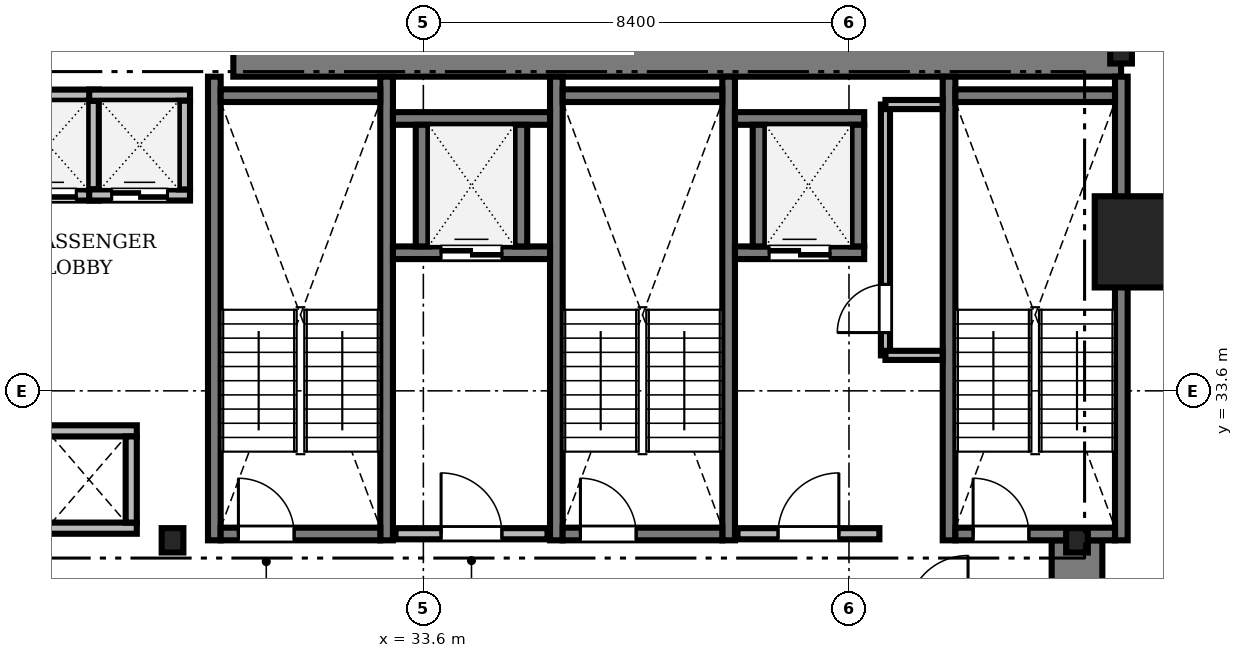
"""IFC4 building model, lengths in metres.
Left out: names, types, materials, properties, quantities, classifications, styles, units other than length and angle.
Written with IfcOpenShell. Run it as: python <this file> out.ifc"""

import sys

from ifc_helpers import new_model, si_unit, direction, frame, frame_2d, origin, origin_2d, place, context, subcontext, project, spatial, rectangle, i_section, extrude, source, transform, mapped, element, fill, save


model = new_model("IFC4")
c1 = context("Model", 3, precision=1e-05, world=origin(), true_north=direction((0.0, 1.0)))
c2 = subcontext(c1, "Body", "Model", "MODEL_VIEW")
j1 = project(units=[si_unit("LENGTHUNIT", "METRE"), si_unit("PLANEANGLEUNIT", "RADIAN")], contexts=[c1])
p1 = place(None, origin())
s1 = spatial("IfcSite", under=j1, at=p1, CompositionType="ELEMENT")
p2 = place(p1, origin())
s2 = spatial("IfcBuilding", under=s1, at=p2, CompositionType="ELEMENT")
p3 = place(p2, frame((0.0, 0.0, 64.1)))
s3 = spatial("IfcBuildingStorey", under=s2, at=p3, CompositionType="ELEMENT", Elevation=64.1)
m1 = source(origin(), c2, "Body", "SweptSolid", [
    extrude(rectangle(XDim=17.52, YDim=1.0, at=frame_2d((8.76, 0.0))), origin(), (0.0, 0.0, 1.0), 3.41),
])
p4 = place(p3, frame((29.85, 40.3, 0.0), z_axis=(0.0, 0.0, 1.0), x_axis=(1.0, 0.0, 0.0)))
e1 = element("IfcWall", 1, at=p4, inside=s3, PredefinedType="SHEAR", context=c2, shape_type="MappedRepresentation", body=[
    mapped(m1, transform((0.0, 0.0, 0.0), scale=1.0)),
])
m2 = source(origin(), c2, "Body", "SweptSolid", [
    extrude(rectangle(XDim=13.15, YDim=1.0, at=frame_2d((6.575, 0.0))), origin(), (0.0, 0.0, 1.0), 3.41),
])
p5 = place(p3, frame((46.5, 17.5, 0.0), z_axis=(0.0, 0.0, 1.0), x_axis=(0.0, 1.0, 0.0)))
e2 = element("IfcWall", 2, at=p5, inside=s3, PredefinedType="SHEAR", context=c2, shape_type="MappedRepresentation", body=[
    mapped(m2, transform((0.0, 0.0, 0.0), scale=1.0)),
])
m3 = source(origin(), c2, "Body", "SweptSolid", [
    extrude(i_section(OverallWidth=0.428, OverallDepth=0.481, WebThickness=0.04, FlangeThickness=0.063, FilletRadius=0.015, at=origin_2d()), origin(), (0.0, 0.0, 1.0), 3.41),
])
for number, where, z_axis, x_axis in (
    (3, (28.65, 30.65, 0.0), (0.0, 0.0, 1.0), (1.0, 0.0, 0.0)),
    (4, (46.5, 30.65, 0.0), (0.0, 0.0, 1.0), (1.0, 0.0, 0.0)),
    (5, (47.37, 40.3, 0.0), (0.0, 0.0, 1.0), (1.0, 0.0, 0.0)),
):
    element("IfcColumn", number, at=place(p3, frame(where, z_axis=z_axis, x_axis=x_axis)), inside=s3, PredefinedType="COLUMN", context=c2, shape_type="MappedRepresentation", body=[
        mapped(m3, transform((0.0, 0.0, 0.0), scale=1.0)),
    ])
m4 = source(origin(), c2, "Body", "SweptSolid", [
    extrude(rectangle(XDim=1.8, YDim=1.8, at=origin_2d()), origin(), (0.0, 0.0, 1.0), 3.41),
])
p6 = place(p3, frame((47.75, 36.54, 0.0), z_axis=(0.0, 0.0, 1.0), x_axis=(1.0, 0.0, 0.0)))
e6 = element("IfcColumn", 6, at=p6, inside=s3, PredefinedType="COLUMN", context=c2, shape_type="MappedRepresentation", body=[
    mapped(m4, transform((0.0, 0.0, 0.0), scale=1.0)),
])
m5 = source(origin(), c2, "Body", "SweptSolid", [
    extrude(rectangle(XDim=9.15, YDim=0.25, at=frame_2d((4.575, 0.0))), origin(), (0.0, 0.0, 1.0), 3.45),
])
for number, where, z_axis, x_axis in (
    (7, (29.475, 30.65, 0.0), (0.0, 0.0, 1.0), (0.0, 1.0, 0.0)),
    (8, (32.875, 30.65, 0.0), (0.0, 0.0, 1.0), (0.0, 1.0, 0.0)),
):
    element("IfcWall", number, at=place(p3, frame(where, z_axis=z_axis, x_axis=x_axis)), inside=s3, PredefinedType="SOLIDWALL", context=c2, shape_type="MappedRepresentation", body=[
        mapped(m5, transform((0.0, 0.0, 0.0), scale=1.0)),
    ])
m6 = source(origin(), c2, "Body", "SweptSolid", [
    extrude(rectangle(XDim=3.15, YDim=0.25, at=frame_2d((1.575, 0.0))), origin(), (0.0, 0.0, 1.0), 3.45),
])
p7 = place(p3, frame((29.6, 39.425, 0.0), z_axis=(0.0, 0.0, 1.0), x_axis=(1.0, 0.0, 0.0)))
e9 = element("IfcWall", 9, at=p7, inside=s3, PredefinedType="SOLIDWALL", context=c2, shape_type="MappedRepresentation", body=[
    mapped(m6, transform((0.0, 0.0, 0.0), scale=1.0)),
])
p8 = place(p3, frame((29.6, 30.775, 0.0), z_axis=(0.0, 0.0, 1.0), x_axis=(1.0, 0.0, 0.0)))
e10 = element("IfcWall", 10, at=p8, inside=s3, PredefinedType="SOLIDWALL", context=c2, shape_type="MappedRepresentation", body=[
    mapped(m6, transform((0.0, 0.0, 0.0), scale=1.0)),
])
m7 = source(origin(), c2, "Body", "SweptSolid", [
    extrude(rectangle(XDim=1.1, YDim=2.2, at=frame_2d((0.55, 1.1))), frame((0.0, 0.135, 0.0), z_axis=(0.0, -1.0, 0.0), x_axis=(1.0, 0.0, 0.0)), (0.0, 0.0, 1.0), 0.27),
])
p9 = place(p8, frame((0.35, 0.0, 0.0)))
e11 = element("IfcOpeningElement", 11, at=p9, cuts=e10, PredefinedType="OPENING", context=c2, shape_type="MappedRepresentation", body=[
    mapped(m7, transform((0.0, 0.0, 0.0), scale=1.0)),
])
for number, where, z_axis, x_axis in (
    (12, (36.225, 30.65, 0.0), (0.0, 0.0, 1.0), (0.0, 1.0, 0.0)),
    (13, (39.625, 30.65, 0.0), (0.0, 0.0, 1.0), (0.0, 1.0, 0.0)),
):
    element("IfcWall", number, at=place(p3, frame(where, z_axis=z_axis, x_axis=x_axis)), inside=s3, PredefinedType="SOLIDWALL", context=c2, shape_type="MappedRepresentation", body=[
        mapped(m5, transform((0.0, 0.0, 0.0), scale=1.0)),
    ])
p10 = place(p3, frame((36.35, 39.425, 0.0), z_axis=(0.0, 0.0, 1.0), x_axis=(1.0, 0.0, 0.0)))
e14 = element("IfcWall", 14, at=p10, inside=s3, PredefinedType="SOLIDWALL", context=c2, shape_type="MappedRepresentation", body=[
    mapped(m6, transform((0.0, 0.0, 0.0), scale=1.0)),
])
p11 = place(p3, frame((36.35, 30.775, 0.0), z_axis=(0.0, 0.0, 1.0), x_axis=(1.0, 0.0, 0.0)))
e15 = element("IfcWall", 15, at=p11, inside=s3, PredefinedType="SOLIDWALL", context=c2, shape_type="MappedRepresentation", body=[
    mapped(m6, transform((0.0, 0.0, 0.0), scale=1.0)),
])
p12 = place(p11, frame((0.35, 0.0, 0.0)))
e16 = element("IfcOpeningElement", 16, at=p12, cuts=e15, PredefinedType="OPENING", context=c2, shape_type="MappedRepresentation", body=[
    mapped(m7, transform((0.0, 0.0, 0.0), scale=1.0)),
])
for number, where, z_axis, x_axis in (
    (17, (43.975, 30.65, 0.0), (0.0, 0.0, 1.0), (0.0, 1.0, 0.0)),
    (18, (47.375, 30.65, 0.0), (0.0, 0.0, 1.0), (0.0, 1.0, 0.0)),
):
    element("IfcWall", number, at=place(p3, frame(where, z_axis=z_axis, x_axis=x_axis)), inside=s3, PredefinedType="SOLIDWALL", context=c2, shape_type="MappedRepresentation", body=[
        mapped(m5, transform((0.0, 0.0, 0.0), scale=1.0)),
    ])
p13 = place(p3, frame((44.1, 39.425, 0.0), z_axis=(0.0, 0.0, 1.0), x_axis=(1.0, 0.0, 0.0)))
e19 = element("IfcWall", 19, at=p13, inside=s3, PredefinedType="SOLIDWALL", context=c2, shape_type="MappedRepresentation", body=[
    mapped(m6, transform((0.0, 0.0, 0.0), scale=1.0)),
])
p14 = place(p3, frame((44.1, 30.775, 0.0), z_axis=(0.0, 0.0, 1.0), x_axis=(1.0, 0.0, 0.0)))
e20 = element("IfcWall", 20, at=p14, inside=s3, PredefinedType="SOLIDWALL", context=c2, shape_type="MappedRepresentation", body=[
    mapped(m6, transform((0.0, 0.0, 0.0), scale=1.0)),
])
p15 = place(p14, frame((0.35, 0.0, 0.0)))
e21 = element("IfcOpeningElement", 21, at=p15, cuts=e20, PredefinedType="OPENING", context=c2, shape_type="MappedRepresentation", body=[
    mapped(m7, transform((0.0, 0.0, 0.0), scale=1.0)),
])
m8 = source(origin(), c2, "Body", "SweptSolid", [
    extrude(rectangle(XDim=3.0, YDim=0.22, at=frame_2d((1.5, 0.0))), origin(), (0.0, 0.0, 1.0), 3.41),
])
p16 = place(p3, frame((33.05, 30.78, 0.0), z_axis=(0.0, 0.0, 1.0), x_axis=(1.0, 0.0, 0.0)))
e22 = element("IfcWall", 22, at=p16, inside=s3, PredefinedType="SOLIDWALL", context=c2, shape_type="MappedRepresentation", body=[
    mapped(m8, transform((0.0, 0.0, 0.0), scale=1.0)),
])
m9 = source(origin(), c2, "Body", "SweptSolid", [
    extrude(rectangle(XDim=1.2, YDim=2.2, at=frame_2d((0.6, 1.1))), frame((0.0, 0.12, 0.0), z_axis=(0.0, -1.0, 0.0), x_axis=(1.0, 0.0, 0.0)), (0.0, 0.0, 1.0), 0.24),
])
p17 = place(p16, frame((0.9, 0.0, 0.0)))
e23 = element("IfcOpeningElement", 23, at=p17, cuts=e22, PredefinedType="OPENING", context=c2, shape_type="MappedRepresentation", body=[
    mapped(m9, transform((0.0, 0.0, 0.0), scale=1.0)),
])
m10 = source(origin(), c2, "Body", "SweptSolid", [
    extrude(rectangle(XDim=2.8, YDim=0.22, at=frame_2d((1.4, 0.0))), origin(), (0.0, 0.0, 1.0), 3.41),
])
p18 = place(p3, frame((39.8, 30.78, 0.0), z_axis=(0.0, 0.0, 1.0), x_axis=(1.0, 0.0, 0.0)))
e24 = element("IfcWall", 24, at=p18, inside=s3, PredefinedType="SOLIDWALL", context=c2, shape_type="MappedRepresentation", body=[
    mapped(m10, transform((0.0, 0.0, 0.0), scale=1.0)),
])
p19 = place(p18, frame((0.8, 0.0, 0.0)))
e25 = element("IfcOpeningElement", 25, at=p19, cuts=e24, PredefinedType="OPENING", context=c2, shape_type="MappedRepresentation", body=[
    mapped(m9, transform((0.0, 0.0, 0.0), scale=1.0)),
])
m11 = source(origin(), c2, "Body", "SweptSolid", [
    extrude(rectangle(XDim=1.99, YDim=0.22, at=frame_2d((0.995, 0.0))), origin(), (0.0, 0.0, 1.0), 3.41),
])
p20 = place(p3, frame((25.205, 37.465, 0.0), z_axis=(0.0, 0.0, 1.0), x_axis=(1.0, 0.0, 0.0)))
e26 = element("IfcWall", 26, at=p20, inside=s3, PredefinedType="SOLIDWALL", context=c2, shape_type="MappedRepresentation", body=[
    mapped(m11, transform((0.0, 0.0, 0.0), scale=1.0)),
])
m12 = source(origin(), c2, "Body", "SweptSolid", [
    extrude(rectangle(XDim=1.1, YDim=2.2, at=frame_2d((0.55, 1.1))), frame((0.0, 0.12, 0.0), z_axis=(0.0, -1.0, 0.0), x_axis=(1.0, 0.0, 0.0)), (0.0, 0.0, 1.0), 0.24),
])
p21 = place(p20, frame((0.445, 0.0, 0.0)))
e27 = element("IfcOpeningElement", 27, at=p21, cuts=e26, PredefinedType="OPENING", context=c2, shape_type="MappedRepresentation", body=[
    mapped(m12, transform((0.0, 0.0, 0.0), scale=1.0)),
])
p22 = place(p3, frame((25.205, 39.435, 0.0), z_axis=(0.0, 0.0, 1.0), x_axis=(1.0, 0.0, 0.0)))
e28 = element("IfcWall", 28, at=p22, inside=s3, PredefinedType="SOLIDWALL", context=c2, shape_type="MappedRepresentation", body=[
    mapped(m11, transform((0.0, 0.0, 0.0), scale=1.0)),
])
m13 = source(origin(), c2, "Body", "SweptSolid", [
    extrude(rectangle(XDim=1.75, YDim=0.22, at=frame_2d((0.875, 0.0))), origin(), (0.0, 0.0, 1.0), 3.41),
])
p23 = place(p3, frame((27.085, 37.575, 0.0), z_axis=(0.0, 0.0, 1.0), x_axis=(0.0, 1.0, 0.0)))
e29 = element("IfcWall", 29, at=p23, inside=s3, PredefinedType="SOLIDWALL", context=c2, shape_type="MappedRepresentation", body=[
    mapped(m13, transform((0.0, 0.0, 0.0), scale=1.0)),
])
m14 = source(origin(), c2, "Body", "SweptSolid", [
    extrude(rectangle(XDim=1.99, YDim=0.22, at=frame_2d((0.995, 0.0))), origin(), (0.0, 0.0, 1.0), 3.41),
])
p24 = place(p3, frame((27.005, 37.465, 0.0), z_axis=(0.0, 0.0, 1.0), x_axis=(1.0, 0.0, 0.0)))
e30 = element("IfcWall", 30, at=p24, inside=s3, PredefinedType="SOLIDWALL", context=c2, shape_type="MappedRepresentation", body=[
    mapped(m14, transform((0.0, 0.0, 0.0), scale=1.0)),
])
p25 = place(p24, frame((0.445, 0.0, 0.0)))
e31 = element("IfcOpeningElement", 31, at=p25, cuts=e30, PredefinedType="OPENING", context=c2, shape_type="MappedRepresentation", body=[
    mapped(m12, transform((0.0, 0.0, 0.0), scale=1.0)),
])
p26 = place(p3, frame((27.005, 39.435, 0.0), z_axis=(0.0, 0.0, 1.0), x_axis=(1.0, 0.0, 0.0)))
e32 = element("IfcWall", 32, at=p26, inside=s3, PredefinedType="SOLIDWALL", context=c2, shape_type="MappedRepresentation", body=[
    mapped(m14, transform((0.0, 0.0, 0.0), scale=1.0)),
])
p27 = place(p3, frame((28.885, 37.575, 0.0), z_axis=(0.0, 0.0, 1.0), x_axis=(0.0, 1.0, 0.0)))
e33 = element("IfcWall", 33, at=p27, inside=s3, PredefinedType="SOLIDWALL", context=c2, shape_type="MappedRepresentation", body=[
    mapped(m13, transform((0.0, 0.0, 0.0), scale=1.0)),
])
m15 = source(origin(), c2, "Body", "SweptSolid", [
    extrude(rectangle(XDim=3.1, YDim=0.25, at=frame_2d((1.55, 0.0))), origin(), (0.0, 0.0, 1.0), 3.41),
])
p28 = place(p3, frame((33.0, 36.325, 0.0), z_axis=(0.0, 0.0, 1.0), x_axis=(1.0, 0.0, 0.0)))
e34 = element("IfcWall", 34, at=p28, inside=s3, PredefinedType="SOLIDWALL", context=c2, shape_type="MappedRepresentation", body=[
    mapped(m15, transform((0.0, 0.0, 0.0), scale=1.0)),
])
m16 = source(origin(), c2, "Body", "SweptSolid", [
    extrude(rectangle(XDim=1.2, YDim=2.25, at=frame_2d((0.6, 1.125))), frame((0.0, 0.135, 0.0), z_axis=(0.0, -1.0, 0.0), x_axis=(1.0, 0.0, 0.0)), (0.0, 0.0, 1.0), 0.27),
])
p29 = place(p28, frame((0.95, 0.0, 0.0)))
e35 = element("IfcOpeningElement", 35, at=p29, cuts=e34, PredefinedType="OPENING", context=c2, shape_type="MappedRepresentation", body=[
    mapped(m16, transform((0.0, 0.0, 0.0), scale=1.0)),
])
p30 = place(p3, frame((33.0, 38.975, 0.0), z_axis=(0.0, 0.0, 1.0), x_axis=(1.0, 0.0, 0.0)))
e36 = element("IfcWall", 36, at=p30, inside=s3, PredefinedType="SOLIDWALL", context=c2, shape_type="MappedRepresentation", body=[
    mapped(m15, transform((0.0, 0.0, 0.0), scale=1.0)),
])
m17 = source(origin(), c2, "Body", "SweptSolid", [
    extrude(rectangle(XDim=2.4, YDim=0.25, at=frame_2d((1.2, 0.0))), origin(), (0.0, 0.0, 1.0), 3.41),
])
for number, where, z_axis, x_axis in (
    (37, (33.575, 36.45, 0.0), (0.0, 0.0, 1.0), (0.0, 1.0, 0.0)),
    (38, (35.525, 36.45, 0.0), (0.0, 0.0, 1.0), (0.0, 1.0, 0.0)),
):
    element("IfcWall", number, at=place(p3, frame(where, z_axis=z_axis, x_axis=x_axis)), inside=s3, PredefinedType="SOLIDWALL", context=c2, shape_type="MappedRepresentation", body=[
        mapped(m17, transform((0.0, 0.0, 0.0), scale=1.0)),
    ])
m18 = source(origin(), c2, "Body", "SweptSolid", [
    extrude(rectangle(XDim=2.55, YDim=0.25, at=frame_2d((1.275, 0.0))), origin(), (0.0, 0.0, 1.0), 3.41),
])
p31 = place(p3, frame((39.75, 36.325, 0.0), z_axis=(0.0, 0.0, 1.0), x_axis=(1.0, 0.0, 0.0)))
e39 = element("IfcWall", 39, at=p31, inside=s3, PredefinedType="SOLIDWALL", context=c2, shape_type="MappedRepresentation", body=[
    mapped(m18, transform((0.0, 0.0, 0.0), scale=1.0)),
])
p32 = place(p31, frame((0.675, 0.0, 0.0)))
e40 = element("IfcOpeningElement", 40, at=p32, cuts=e39, PredefinedType="OPENING", context=c2, shape_type="MappedRepresentation", body=[
    mapped(m16, transform((0.0, 0.0, 0.0), scale=1.0)),
])
p33 = place(p3, frame((39.75, 38.975, 0.0), z_axis=(0.0, 0.0, 1.0), x_axis=(1.0, 0.0, 0.0)))
e41 = element("IfcWall", 41, at=p33, inside=s3, PredefinedType="SOLIDWALL", context=c2, shape_type="MappedRepresentation", body=[
    mapped(m18, transform((0.0, 0.0, 0.0), scale=1.0)),
])
for number, where, z_axis, x_axis in (
    (42, (40.225, 36.45, 0.0), (0.0, 0.0, 1.0), (0.0, 1.0, 0.0)),
    (43, (42.175, 36.45, 0.0), (0.0, 0.0, 1.0), (0.0, 1.0, 0.0)),
):
    element("IfcWall", number, at=place(p3, frame(where, z_axis=z_axis, x_axis=x_axis)), inside=s3, PredefinedType="SOLIDWALL", context=c2, shape_type="MappedRepresentation", body=[
        mapped(m17, transform((0.0, 0.0, 0.0), scale=1.0)),
    ])
m19 = source(origin(), c2, "Body", "SweptSolid", [
    extrude(rectangle(XDim=1.89, YDim=0.22, at=frame_2d((0.945, 0.0))), origin(), (0.0, 0.0, 1.0), 3.41),
])
for number, where, z_axis, x_axis in (
    (44, (26.055, 30.89, 0.0), (0.0, 0.0, 1.0), (1.0, 0.0, 0.0)),
    (45, (26.055, 32.81, 0.0), (0.0, 0.0, 1.0), (1.0, 0.0, 0.0)),
):
    element("IfcWall", number, at=place(p3, frame(where, z_axis=z_axis, x_axis=x_axis)), inside=s3, PredefinedType="SOLIDWALL", context=c2, shape_type="MappedRepresentation", body=[
        mapped(m19, transform((0.0, 0.0, 0.0), scale=1.0)),
    ])
m20 = source(origin(), c2, "Body", "SweptSolid", [
    extrude(rectangle(XDim=1.7, YDim=0.22, at=frame_2d((0.85, 0.0))), origin(), (0.0, 0.0, 1.0), 3.41),
])
p34 = place(p3, frame((27.835, 31.0, 0.0), z_axis=(0.0, 0.0, 1.0), x_axis=(0.0, 1.0, 0.0)))
e46 = element("IfcWall", 46, at=p34, inside=s3, PredefinedType="SOLIDWALL", context=c2, shape_type="MappedRepresentation", body=[
    mapped(m20, transform((0.0, 0.0, 0.0), scale=1.0)),
])
m21 = source(origin(), c2, "Body", "SweptSolid", [
    extrude(rectangle(XDim=4.95, YDim=0.18, at=frame_2d((2.475, 0.0))), origin(), (0.0, 0.0, 1.0), 3.41),
])
p35 = place(p3, frame((42.72, 34.3, 0.0), z_axis=(0.0, 0.0, 1.0), x_axis=(0.0, 1.0, 0.0)))
e47 = element("IfcWall", 47, at=p35, inside=s3, PredefinedType="PARTITIONING", context=c2, shape_type="MappedRepresentation", body=[
    mapped(m21, transform((0.0, 0.0, 0.0), scale=1.0)),
])
m22 = source(origin(), c2, "Body", "SweptSolid", [
    extrude(rectangle(XDim=0.95, YDim=2.15, at=frame_2d((0.475, 1.075))), frame((0.0, 0.1, 0.0), z_axis=(0.0, -1.0, 0.0), x_axis=(1.0, 0.0, 0.0)), (0.0, 0.0, 1.0), 0.2),
])
p36 = place(p35, frame((0.45, 0.0, 0.0)))
e48 = element("IfcOpeningElement", 48, at=p36, cuts=e47, PredefinedType="OPENING", context=c2, shape_type="MappedRepresentation", body=[
    mapped(m22, transform((0.0, 0.0, 0.0), scale=1.0)),
])
m23 = source(origin(), c2, "Body", "SweptSolid", [
    extrude(rectangle(XDim=1.128, YDim=0.18, at=frame_2d((0.564, 0.0))), origin(), (0.0, 0.0, 1.0), 3.41),
])
for number, where, z_axis, x_axis in (
    (49, (42.72, 34.3, 0.0), (0.0, 0.0, 1.0), (1.0, 0.0, 0.0)),
    (50, (42.72, 39.25, 0.0), (0.0, 0.0, 1.0), (1.0, 0.0, 0.0)),
):
    element("IfcWall", number, at=place(p3, frame(where, z_axis=z_axis, x_axis=x_axis)), inside=s3, PredefinedType="PARTITIONING", context=c2, shape_type="MappedRepresentation", body=[
        mapped(m23, transform((0.0, 0.0, 0.0), scale=1.0)),
    ])
m24 = source(origin(), c2, "Body", "SweptSolid", [
    extrude(rectangle(XDim=1.1, YDim=2.2, at=frame_2d((0.55, 1.1))), frame((0.0, 0.025, 0.0), z_axis=(0.0, -1.0, 0.0), x_axis=(1.0, 0.0, 0.0)), (0.0, 0.0, 1.0), 0.05),
])
p37 = place(p9, origin())
e51 = element("IfcDoor", 51, at=p37, inside=s3, OperationType="SINGLE_SWING_LEFT", PredefinedType="DOOR", context=c2, shape_type="MappedRepresentation", body=[
    mapped(m24, transform((0.0, 0.0, 0.0), scale=1.0)),
])
fill(e11, e51)
p38 = place(p12, origin())
e52 = element("IfcDoor", 52, at=p38, inside=s3, OperationType="SINGLE_SWING_LEFT", PredefinedType="DOOR", context=c2, shape_type="MappedRepresentation", body=[
    mapped(m24, transform((0.0, 0.0, 0.0), scale=1.0)),
])
fill(e16, e52)
p39 = place(p15, origin())
e53 = element("IfcDoor", 53, at=p39, inside=s3, OperationType="SINGLE_SWING_LEFT", PredefinedType="DOOR", context=c2, shape_type="MappedRepresentation", body=[
    mapped(m24, transform((0.0, 0.0, 0.0), scale=1.0)),
])
fill(e21, e53)
m25 = source(origin(), c2, "Body", "SweptSolid", [
    extrude(rectangle(XDim=1.2, YDim=2.2, at=frame_2d((0.6, 1.1))), frame((0.0, 0.025, 0.0), z_axis=(0.0, -1.0, 0.0), x_axis=(1.0, 0.0, 0.0)), (0.0, 0.0, 1.0), 0.05),
])
p40 = place(p17, origin())
e54 = element("IfcDoor", 54, at=p40, inside=s3, OperationType="SINGLE_SWING_LEFT", PredefinedType="DOOR", context=c2, shape_type="MappedRepresentation", body=[
    mapped(m25, transform((0.0, 0.0, 0.0), scale=1.0)),
])
fill(e23, e54)
p41 = place(p19, origin())
e55 = element("IfcDoor", 55, at=p41, inside=s3, OperationType="SINGLE_SWING_RIGHT", PredefinedType="DOOR", context=c2, shape_type="MappedRepresentation", body=[
    mapped(m25, transform((0.0, 0.0, 0.0), scale=1.0)),
])
fill(e25, e55)
p42 = place(p21, origin())
e56 = element("IfcDoor", 56, at=p42, inside=s3, OperationType="DOUBLE_DOOR_SLIDING", PredefinedType="DOOR", context=c2, shape_type="MappedRepresentation", body=[
    mapped(m24, transform((0.0, 0.0, 0.0), scale=1.0)),
])
fill(e27, e56)
p43 = place(p25, origin())
e57 = element("IfcDoor", 57, at=p43, inside=s3, OperationType="DOUBLE_DOOR_SLIDING", PredefinedType="DOOR", context=c2, shape_type="MappedRepresentation", body=[
    mapped(m24, transform((0.0, 0.0, 0.0), scale=1.0)),
])
fill(e31, e57)
m26 = source(origin(), c2, "Body", "SweptSolid", [
    extrude(rectangle(XDim=1.2, YDim=2.25, at=frame_2d((0.6, 1.125))), frame((0.0, 0.025, 0.0), z_axis=(0.0, -1.0, 0.0), x_axis=(1.0, 0.0, 0.0)), (0.0, 0.0, 1.0), 0.05),
])
p44 = place(p29, origin())
e58 = element("IfcDoor", 58, at=p44, inside=s3, OperationType="DOUBLE_DOOR_SLIDING", PredefinedType="DOOR", context=c2, shape_type="MappedRepresentation", body=[
    mapped(m26, transform((0.0, 0.0, 0.0), scale=1.0)),
])
fill(e35, e58)
p45 = place(p32, origin())
e59 = element("IfcDoor", 59, at=p45, inside=s3, OperationType="DOUBLE_DOOR_SLIDING", PredefinedType="DOOR", context=c2, shape_type="MappedRepresentation", body=[
    mapped(m26, transform((0.0, 0.0, 0.0), scale=1.0)),
])
fill(e40, e59)
m27 = source(origin(), c2, "Body", "SweptSolid", [
    extrude(rectangle(XDim=0.95, YDim=2.15, at=frame_2d((0.475, 1.075))), frame((0.0, 0.025, 0.0), z_axis=(0.0, -1.0, 0.0), x_axis=(1.0, 0.0, 0.0)), (0.0, 0.0, 1.0), 0.05),
])
p46 = place(p36, origin())
e60 = element("IfcDoor", 60, at=p46, inside=s3, OperationType="SINGLE_SWING_LEFT", PredefinedType="DOOR", context=c2, shape_type="MappedRepresentation", body=[
    mapped(m27, transform((0.0, 0.0, 0.0), scale=1.0)),
])
fill(e48, e60)
save(model, sys.argv[1])
